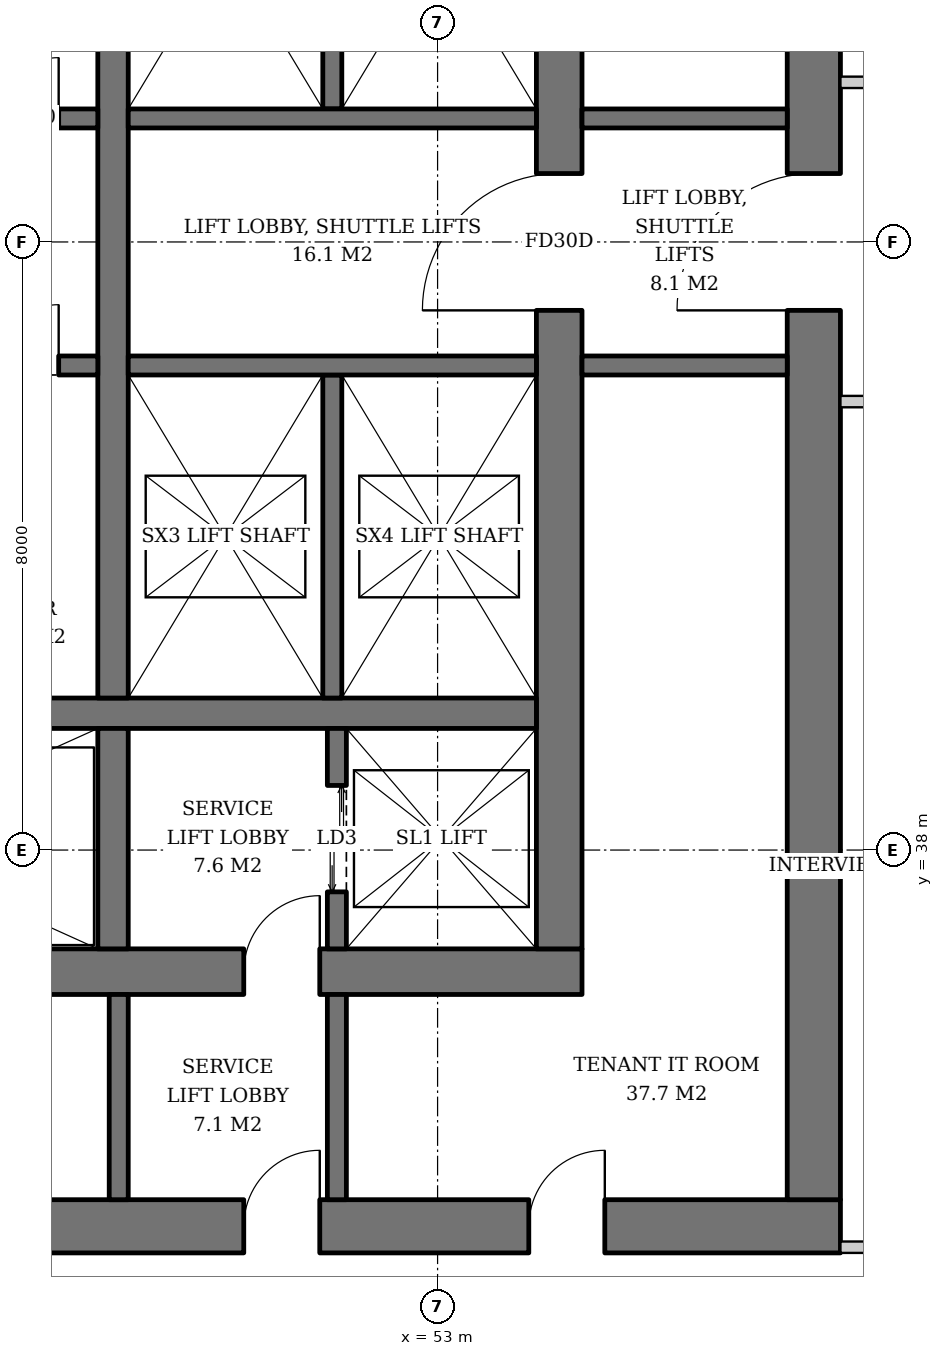
"""IFC4 building model, lengths in metres.
Left out: names, types, materials, properties, quantities, classifications, styles, units other than length and angle.
Written with IfcOpenShell. Run it as: python <this file> out.ifc"""

import sys

from ifc_helpers import new_model, si_unit, direction, frame, frame_2d, origin, place, context, subcontext, project, spatial, rectangle, extrude, element, fill, save


model = new_model("IFC4")
c1 = context("Model", 3, precision=1e-05, world=origin(), true_north=direction((0.0, 1.0)))
c2 = subcontext(c1, "Body", "Model", "MODEL_VIEW")
j1 = project(units=[si_unit("LENGTHUNIT", "METRE"), si_unit("PLANEANGLEUNIT", "RADIAN")], contexts=[c1])
p1 = place(None, origin())
s1 = spatial("IfcSite", under=j1, at=p1, CompositionType="ELEMENT")
p2 = place(p1, origin())
s2 = spatial("IfcBuilding", under=s1, at=p2, CompositionType="ELEMENT")
p3 = place(p2, frame((0.0, 0.0, 138.8)))
s3 = spatial("IfcBuildingStorey", under=s2, at=p3, CompositionType="ELEMENT", Elevation=138.8)
p4 = place(p3, frame((35.1, 36.4, 0.0), z_axis=(0.0, 0.0, 1.0), x_axis=(1.0, 0.0, 0.0)))
e1 = element("IfcWall", 1, at=p4, inside=s3, PredefinedType="SHEAR", context=c2, shape_type="SweptSolid", body=[
    extrude(rectangle(XDim=19.8, YDim=0.6, at=frame_2d((9.9, 0.0))), origin(), (0.0, 0.0, 1.0), 3.8),
])
p5 = place(p4, frame((3.9, 0.0, 0.0)))
e2 = element("IfcOpeningElement", 2, at=p5, cuts=e1, PredefinedType="OPENING", context=c2, shape_type="SweptSolid", body=[
    extrude(rectangle(XDim=1.0, YDim=2.1, at=frame_2d((0.5, 1.05))), frame((0.0, 0.31, 0.0), z_axis=(0.0, -1.0, 0.0), x_axis=(1.0, 0.0, 0.0)), (0.0, 0.0, 1.0), 0.62),
])
p6 = place(p4, frame((15.35, 0.0, 0.0)))
e3 = element("IfcOpeningElement", 3, at=p6, cuts=e1, PredefinedType="OPENING", context=c2, shape_type="SweptSolid", body=[
    extrude(rectangle(XDim=1.0, YDim=2.1, at=frame_2d((0.5, 1.05))), frame((0.0, 0.31, 0.0), z_axis=(0.0, -1.0, 0.0), x_axis=(1.0, 0.0, 0.0)), (0.0, 0.0, 1.0), 0.62),
])
p7 = place(p3, frame((54.6, 36.7, 0.0), z_axis=(0.0, 0.0, 1.0), x_axis=(0.0, 1.0, 0.0)))
e4 = element("IfcWall", 4, at=p7, inside=s3, PredefinedType="SHEAR", context=c2, shape_type="SweptSolid", body=[
    extrude(rectangle(XDim=18.6, YDim=0.6, at=frame_2d((9.3, 0.0))), origin(), (0.0, 0.0, 1.0), 3.8),
])
p8 = place(p7, frame((8.4, 0.0, 0.0)))
e5 = element("IfcOpeningElement", 5, at=p8, cuts=e4, PredefinedType="OPENING", context=c2, shape_type="SweptSolid", body=[
    extrude(rectangle(XDim=1.8, YDim=2.4, at=frame_2d((0.9, 1.2))), frame((0.0, 0.31, 0.0), z_axis=(0.0, -1.0, 0.0), x_axis=(1.0, 0.0, 0.0)), (0.0, 0.0, 1.0), 0.62),
])
p9 = place(p3, frame((31.7, 33.05, 0.0), z_axis=(0.0, 0.0, 1.0), x_axis=(1.0, 0.0, 0.0)))
e6 = element("IfcWall", 6, at=p9, inside=s3, PredefinedType="SHEAR", context=c2, shape_type="SweptSolid", body=[
    extrude(rectangle(XDim=26.6, YDim=0.7, at=frame_2d((13.3, 0.0))), origin(), (0.0, 0.0, 1.0), 3.8),
])
p10 = place(p9, frame((7.3, 0.0, 0.0)))
e7 = element("IfcOpeningElement", 7, at=p10, cuts=e6, PredefinedType="OPENING", context=c2, shape_type="SweptSolid", body=[
    extrude(rectangle(XDim=1.0, YDim=2.1, at=frame_2d((0.5, 1.05))), frame((0.0, 0.36, 0.0), z_axis=(0.0, -1.0, 0.0), x_axis=(1.0, 0.0, 0.0)), (0.0, 0.0, 1.0), 0.72),
])
p11 = place(p9, frame((18.75, 0.0, 0.0)))
e8 = element("IfcOpeningElement", 8, at=p11, cuts=e6, PredefinedType="OPENING", context=c2, shape_type="SweptSolid", body=[
    extrude(rectangle(XDim=1.0, YDim=2.1, at=frame_2d((0.5, 1.05))), frame((0.0, 0.36, 0.0), z_axis=(0.0, -1.0, 0.0), x_axis=(1.0, 0.0, 0.0)), (0.0, 0.0, 1.0), 0.72),
])
p12 = place(p9, frame((3.2, 0.0, 0.0)))
e9 = element("IfcOpeningElement", 9, at=p12, cuts=e6, PredefinedType="OPENING", context=c2, shape_type="SweptSolid", body=[
    extrude(rectangle(XDim=1.0, YDim=2.1, at=frame_2d((0.5, 1.05))), frame((0.0, 0.36, 0.0), z_axis=(0.0, -1.0, 0.0), x_axis=(1.0, 0.0, 0.0)), (0.0, 0.0, 1.0), 0.72),
])
p13 = place(p9, frame((10.42, 0.0, 0.0)))
e10 = element("IfcOpeningElement", 10, at=p13, cuts=e6, PredefinedType="OPENING", context=c2, shape_type="SweptSolid", body=[
    extrude(rectangle(XDim=1.0, YDim=2.1, at=frame_2d((0.5, 1.05))), frame((0.0, 0.36, 0.0), z_axis=(0.0, -1.0, 0.0), x_axis=(1.0, 0.0, 0.0)), (0.0, 0.0, 1.0), 0.72),
])
p14 = place(p9, frame((14.46, 0.0, 0.0)))
e11 = element("IfcOpeningElement", 11, at=p14, cuts=e6, PredefinedType="OPENING", context=c2, shape_type="SweptSolid", body=[
    extrude(rectangle(XDim=1.0, YDim=2.1, at=frame_2d((0.5, 1.05))), frame((0.0, 0.36, 0.0), z_axis=(0.0, -1.0, 0.0), x_axis=(1.0, 0.0, 0.0)), (0.0, 0.0, 1.0), 0.72),
])
p15 = place(p9, frame((22.5, 0.0, 0.0)))
e12 = element("IfcOpeningElement", 12, at=p15, cuts=e6, PredefinedType="OPENING", context=c2, shape_type="SweptSolid", body=[
    extrude(rectangle(XDim=1.0, YDim=2.1, at=frame_2d((0.5, 1.05))), frame((0.0, 0.36, 0.0), z_axis=(0.0, -1.0, 0.0), x_axis=(1.0, 0.0, 0.0)), (0.0, 0.0, 1.0), 0.72),
])
p16 = place(p3, frame((57.95, 33.4, 0.0), z_axis=(0.0, 0.0, 1.0), x_axis=(0.0, 1.0, 0.0)))
e13 = element("IfcWall", 13, at=p16, inside=s3, PredefinedType="SHEAR", context=c2, shape_type="SweptSolid", body=[
    extrude(rectangle(XDim=25.2, YDim=0.7, at=frame_2d((12.6, 0.0))), origin(), (0.0, 0.0, 1.0), 3.8),
])
p17 = place(p16, frame((11.7, 0.0, 0.0)))
e14 = element("IfcOpeningElement", 14, at=p17, cuts=e13, PredefinedType="OPENING", context=c2, shape_type="SweptSolid", body=[
    extrude(rectangle(XDim=1.8, YDim=2.4, at=frame_2d((0.9, 1.2))), frame((0.0, 0.36, 0.0), z_axis=(0.0, -1.0, 0.0), x_axis=(1.0, 0.0, 0.0)), (0.0, 0.0, 1.0), 0.72),
])
p18 = place(p3, frame((35.7, 39.8, 0.0), z_axis=(0.0, 0.0, 1.0), x_axis=(1.0, 0.0, 0.0)))
e15 = element("IfcWall", 15, at=p18, inside=s3, PredefinedType="SHEAR", context=c2, shape_type="SweptSolid", body=[
    extrude(rectangle(XDim=18.6, YDim=0.4, at=frame_2d((9.3, 0.0))), origin(), (0.0, 0.0, 1.0), 3.8),
])
p19 = place(p3, frame((48.73, 36.7, 0.0), z_axis=(0.0, 0.0, 1.0), x_axis=(0.0, 1.0, 0.0)))
e16 = element("IfcWall", 16, at=p19, inside=s3, PredefinedType="SHEAR", context=c2, shape_type="SweptSolid", body=[
    extrude(rectangle(XDim=2.9, YDim=0.4, at=frame_2d((1.45, 0.0))), origin(), (0.0, 0.0, 1.0), 3.8),
])
p20 = place(p3, frame((48.73, 40.0, 0.0), z_axis=(0.0, 0.0, 1.0), x_axis=(0.0, 1.0, 0.0)))
e17 = element("IfcWall", 17, at=p20, inside=s3, PredefinedType="SHEAR", context=c2, shape_type="SweptSolid", body=[
    extrude(rectangle(XDim=12.0, YDim=0.4, at=frame_2d((6.0, 0.0))), origin(), (0.0, 0.0, 1.0), 3.8),
])
p21 = place(p3, frame((51.675, 36.7, 0.0), z_axis=(0.0, 0.0, 1.0), x_axis=(0.0, 1.0, 0.0)))
e18 = element("IfcWall", 18, at=p21, inside=s3, PredefinedType="SHEAR", context=c2, shape_type="SweptSolid", body=[
    extrude(rectangle(XDim=2.9, YDim=0.25, at=frame_2d((1.45, 0.0))), origin(), (0.0, 0.0, 1.0), 3.8),
])
p22 = place(p21, frame((0.75, 0.0, 0.0)))
e19 = element("IfcOpeningElement", 19, at=p22, cuts=e18, PredefinedType="OPENING", context=c2, shape_type="SweptSolid", body=[
    extrude(rectangle(XDim=1.4, YDim=2.4, at=frame_2d((0.7, 1.2))), frame((0.0, 0.135, 0.0), z_axis=(0.0, -1.0, 0.0), x_axis=(1.0, 0.0, 0.0)), (0.0, 0.0, 1.0), 0.27),
])
p23 = place(p3, frame((35.7, 47.625, 0.0), z_axis=(0.0, 0.0, 1.0), x_axis=(1.0, 0.0, 0.0)))
e20 = element("IfcWall", 20, at=p23, inside=s3, PredefinedType="SHEAR", context=c2, shape_type="SweptSolid", body=[
    extrude(rectangle(XDim=12.83, YDim=0.25, at=frame_2d((6.415, 0.0))), origin(), (0.0, 0.0, 1.0), 3.8),
])
p24 = place(p23, frame((0.7, 0.0, 0.0)))
e21 = element("IfcOpeningElement", 21, at=p24, cuts=e20, PredefinedType="OPENING", context=c2, shape_type="SweptSolid", body=[
    extrude(rectangle(XDim=1.1, YDim=2.2, at=frame_2d((0.55, 1.1))), frame((0.0, 0.135, 0.0), z_axis=(0.0, -1.0, 0.0), x_axis=(1.0, 0.0, 0.0)), (0.0, 0.0, 1.0), 0.27),
])
p25 = place(p23, frame((3.45, 0.0, 0.0)))
e22 = element("IfcOpeningElement", 22, at=p25, cuts=e20, PredefinedType="OPENING", context=c2, shape_type="SweptSolid", body=[
    extrude(rectangle(XDim=1.1, YDim=2.2, at=frame_2d((0.55, 1.1))), frame((0.0, 0.135, 0.0), z_axis=(0.0, -1.0, 0.0), x_axis=(1.0, 0.0, 0.0)), (0.0, 0.0, 1.0), 0.27),
])
p26 = place(p23, frame((6.2, 0.0, 0.0)))
e23 = element("IfcOpeningElement", 23, at=p26, cuts=e20, PredefinedType="OPENING", context=c2, shape_type="SweptSolid", body=[
    extrude(rectangle(XDim=1.1, YDim=2.2, at=frame_2d((0.55, 1.1))), frame((0.0, 0.135, 0.0), z_axis=(0.0, -1.0, 0.0), x_axis=(1.0, 0.0, 0.0)), (0.0, 0.0, 1.0), 0.27),
])
p27 = place(p23, frame((8.95, 0.0, 0.0)))
e24 = element("IfcOpeningElement", 24, at=p27, cuts=e20, PredefinedType="OPENING", context=c2, shape_type="SweptSolid", body=[
    extrude(rectangle(XDim=1.1, YDim=2.2, at=frame_2d((0.55, 1.1))), frame((0.0, 0.135, 0.0), z_axis=(0.0, -1.0, 0.0), x_axis=(1.0, 0.0, 0.0)), (0.0, 0.0, 1.0), 0.27),
])
p28 = place(p23, frame((11.515, 0.0, 0.0)))
e25 = element("IfcOpeningElement", 25, at=p28, cuts=e20, PredefinedType="OPENING", context=c2, shape_type="SweptSolid", body=[
    extrude(rectangle(XDim=0.8, YDim=2.0, at=frame_2d((0.4, 1.0))), frame((0.0, 0.135, 0.0), z_axis=(0.0, -1.0, 0.0), x_axis=(1.0, 0.0, 0.0)), (0.0, 0.0, 1.0), 0.27),
])
p29 = place(p3, frame((35.7, 44.375, 0.0), z_axis=(0.0, 0.0, 1.0), x_axis=(1.0, 0.0, 0.0)))
e26 = element("IfcWall", 26, at=p29, inside=s3, PredefinedType="SHEAR", context=c2, shape_type="SweptSolid", body=[
    extrude(rectangle(XDim=12.83, YDim=0.25, at=frame_2d((6.415, 0.0))), origin(), (0.0, 0.0, 1.0), 3.8),
])
p30 = place(p29, frame((0.7, 0.0, 0.0)))
e27 = element("IfcOpeningElement", 27, at=p30, cuts=e26, PredefinedType="OPENING", context=c2, shape_type="SweptSolid", body=[
    extrude(rectangle(XDim=1.1, YDim=2.2, at=frame_2d((0.55, 1.1))), frame((0.0, 0.135, 0.0), z_axis=(0.0, -1.0, 0.0), x_axis=(1.0, 0.0, 0.0)), (0.0, 0.0, 1.0), 0.27),
])
p31 = place(p29, frame((3.45, 0.0, 0.0)))
e28 = element("IfcOpeningElement", 28, at=p31, cuts=e26, PredefinedType="OPENING", context=c2, shape_type="SweptSolid", body=[
    extrude(rectangle(XDim=1.1, YDim=2.2, at=frame_2d((0.55, 1.1))), frame((0.0, 0.135, 0.0), z_axis=(0.0, -1.0, 0.0), x_axis=(1.0, 0.0, 0.0)), (0.0, 0.0, 1.0), 0.27),
])
p32 = place(p29, frame((6.2, 0.0, 0.0)))
e29 = element("IfcOpeningElement", 29, at=p32, cuts=e26, PredefinedType="OPENING", context=c2, shape_type="SweptSolid", body=[
    extrude(rectangle(XDim=1.1, YDim=2.2, at=frame_2d((0.55, 1.1))), frame((0.0, 0.135, 0.0), z_axis=(0.0, -1.0, 0.0), x_axis=(1.0, 0.0, 0.0)), (0.0, 0.0, 1.0), 0.27),
])
p33 = place(p29, frame((8.95, 0.0, 0.0)))
e30 = element("IfcOpeningElement", 30, at=p33, cuts=e26, PredefinedType="OPENING", context=c2, shape_type="SweptSolid", body=[
    extrude(rectangle(XDim=1.1, YDim=2.2, at=frame_2d((0.55, 1.1))), frame((0.0, 0.135, 0.0), z_axis=(0.0, -1.0, 0.0), x_axis=(1.0, 0.0, 0.0)), (0.0, 0.0, 1.0), 0.27),
])
p34 = place(p29, frame((11.515, 0.0, 0.0)))
e31 = element("IfcOpeningElement", 31, at=p34, cuts=e26, PredefinedType="OPENING", context=c2, shape_type="SweptSolid", body=[
    extrude(rectangle(XDim=0.8, YDim=2.0, at=frame_2d((0.4, 1.0))), frame((0.0, 0.135, 0.0), z_axis=(0.0, -1.0, 0.0), x_axis=(1.0, 0.0, 0.0)), (0.0, 0.0, 1.0), 0.27),
])
p35 = place(p3, frame((51.615, 47.75, 0.0), z_axis=(0.0, 0.0, 1.0), x_axis=(0.0, 1.0, 0.0)))
e32 = element("IfcWall", 32, at=p35, inside=s3, PredefinedType="SHEAR", context=c2, shape_type="SweptSolid", body=[
    extrude(rectangle(XDim=4.25, YDim=0.25, at=frame_2d((2.125, 0.0))), origin(), (0.0, 0.0, 1.0), 3.8),
])
p36 = place(p3, frame((48.93, 47.625, 0.0), z_axis=(0.0, 0.0, 1.0), x_axis=(1.0, 0.0, 0.0)))
e33 = element("IfcWall", 33, at=p36, inside=s3, PredefinedType="SHEAR", context=c2, shape_type="SweptSolid", body=[
    extrude(rectangle(XDim=5.37, YDim=0.25, at=frame_2d((2.685, 0.0))), origin(), (0.0, 0.0, 1.0), 3.8),
])
p37 = place(p3, frame((51.615, 44.25, 0.0), z_axis=(0.0, 0.0, 1.0), x_axis=(0.0, -1.0, 0.0)))
e34 = element("IfcWall", 34, at=p37, inside=s3, PredefinedType="SHEAR", context=c2, shape_type="SweptSolid", body=[
    extrude(rectangle(XDim=4.25, YDim=0.25, at=frame_2d((2.125, 0.0))), origin(), (0.0, 0.0, 1.0), 3.8),
])
p38 = place(p3, frame((48.93, 44.375, 0.0), z_axis=(0.0, 0.0, 1.0), x_axis=(1.0, 0.0, 0.0)))
e35 = element("IfcWall", 35, at=p38, inside=s3, PredefinedType="SHEAR", context=c2, shape_type="SweptSolid", body=[
    extrude(rectangle(XDim=5.37, YDim=0.25, at=frame_2d((2.685, 0.0))), origin(), (0.0, 0.0, 1.0), 3.8),
])
for number, where, z_axis, x_axis in (
    (36, (54.9, 44.375, 0.0), (0.0, 0.0, 1.0), (1.0, 0.0, 0.0)),
    (37, (54.9, 47.625, 0.0), (0.0, 0.0, 1.0), (1.0, 0.0, 0.0)),
    (38, (48.805, 33.4, 0.0), (0.0, 0.0, 1.0), (0.0, 1.0, 0.0)),
    (39, (51.675, 33.4, 0.0), (0.0, 0.0, 1.0), (0.0, 1.0, 0.0)),
):
    element("IfcWall", number, at=place(p3, frame(where, z_axis=z_axis, x_axis=x_axis)), inside=s3, PredefinedType="SOLIDWALL", context=c2, shape_type="SweptSolid", body=[
        extrude(rectangle(XDim=2.7, YDim=0.25, at=frame_2d((1.35, 0.0))), origin(), (0.0, 0.0, 1.0), 3.62),
    ])
for number, where, z_axis, x_axis in (
    (40, (58.3, 32.775, 0.0), (0.0, 0.0, 1.0), (1.0, 0.0, 0.0)),
    (41, (58.3, 43.9, 0.0), (0.0, 0.0, 1.0), (1.0, 0.0, 0.0)),
    (42, (58.3, 48.1, 0.0), (0.0, 0.0, 1.0), (1.0, 0.0, 0.0)),
):
    element("IfcWall", number, at=place(p3, frame(where, z_axis=z_axis, x_axis=x_axis)), inside=s3, PredefinedType="PARTITIONING", context=c2, shape_type="SweptSolid", body=[
        extrude(rectangle(XDim=1.725, YDim=0.15, at=frame_2d((0.862, 0.0))), origin(), (0.0, 0.0, 1.0), 3.62),
    ])
p39 = place(p22, origin())
e43 = element("IfcDoor", 43, at=p39, inside=s3, OperationType="DOUBLE_DOOR_SLIDING", PredefinedType="DOOR", context=c2, shape_type="SweptSolid", body=[
    extrude(rectangle(XDim=1.4, YDim=2.4, at=frame_2d((0.7, 1.2))), frame((0.0, 0.025, 0.0), z_axis=(0.0, -1.0, 0.0), x_axis=(1.0, 0.0, 0.0)), (0.0, 0.0, 1.0), 0.05),
])
fill(e19, e43)
p40 = place(p28, origin())
e44 = element("IfcDoor", 44, at=p40, inside=s3, OperationType="SINGLE_SWING_RIGHT", PredefinedType="DOOR", context=c2, shape_type="SweptSolid", body=[
    extrude(rectangle(XDim=0.8, YDim=2.0, at=frame_2d((0.4, 1.0))), frame((0.0, 0.025, 0.0), z_axis=(0.0, -1.0, 0.0), x_axis=(1.0, 0.0, 0.0)), (0.0, 0.0, 1.0), 0.05),
])
fill(e25, e44)
p41 = place(p34, origin())
e45 = element("IfcDoor", 45, at=p41, inside=s3, OperationType="SINGLE_SWING_RIGHT", PredefinedType="DOOR", context=c2, shape_type="SweptSolid", body=[
    extrude(rectangle(XDim=0.8, YDim=2.0, at=frame_2d((0.4, 1.0))), frame((0.0, 0.025, 0.0), z_axis=(0.0, -1.0, 0.0), x_axis=(1.0, 0.0, 0.0)), (0.0, 0.0, 1.0), 0.05),
])
fill(e31, e45)
p42 = place(p8, origin())
e46 = element("IfcDoor", 46, at=p42, inside=s3, OperationType="DOUBLE_DOOR_SINGLE_SWING", PredefinedType="DOOR", context=c2, shape_type="SweptSolid", body=[
    extrude(rectangle(XDim=1.8, YDim=2.4, at=frame_2d((0.9, 1.2))), frame((0.0, 0.025, 0.0), z_axis=(0.0, -1.0, 0.0), x_axis=(1.0, 0.0, 0.0)), (0.0, 0.0, 1.0), 0.05),
])
fill(e5, e46)
p43 = place(p6, origin())
e47 = element("IfcDoor", 47, at=p43, inside=s3, OperationType="SINGLE_SWING_RIGHT", PredefinedType="DOOR", context=c2, shape_type="SweptSolid", body=[
    extrude(rectangle(XDim=1.0, YDim=2.1, at=frame_2d((0.5, 1.05))), frame((0.0, 0.025, 0.0), z_axis=(0.0, -1.0, 0.0), x_axis=(1.0, 0.0, 0.0)), (0.0, 0.0, 1.0), 0.05),
])
fill(e3, e47)
p44 = place(p17, origin())
e48 = element("IfcDoor", 48, at=p44, inside=s3, OperationType="DOUBLE_DOOR_SINGLE_SWING", PredefinedType="DOOR", context=c2, shape_type="SweptSolid", body=[
    extrude(rectangle(XDim=1.8, YDim=2.4, at=frame_2d((0.9, 1.2))), frame((0.0, 0.025, 0.0), z_axis=(0.0, -1.0, 0.0), x_axis=(1.0, 0.0, 0.0)), (0.0, 0.0, 1.0), 0.05),
])
fill(e14, e48)
p45 = place(p11, origin())
e49 = element("IfcDoor", 49, at=p45, inside=s3, OperationType="SINGLE_SWING_RIGHT", PredefinedType="DOOR", context=c2, shape_type="SweptSolid", body=[
    extrude(rectangle(XDim=1.0, YDim=2.1, at=frame_2d((0.5, 1.05))), frame((0.0, 0.025, 0.0), z_axis=(0.0, -1.0, 0.0), x_axis=(1.0, 0.0, 0.0)), (0.0, 0.0, 1.0), 0.05),
])
fill(e8, e49)
p46 = place(p15, origin())
e50 = element("IfcDoor", 50, at=p46, inside=s3, OperationType="SINGLE_SWING_RIGHT", PredefinedType="DOOR", context=c2, shape_type="SweptSolid", body=[
    extrude(rectangle(XDim=1.0, YDim=2.1, at=frame_2d((0.5, 1.05))), frame((0.0, 0.34, 0.0), z_axis=(0.0, -1.0, 0.0), x_axis=(1.0, 0.0, 0.0)), (0.0, 0.0, 1.0), 0.05),
])
fill(e12, e50)
save(model, sys.argv[1])
